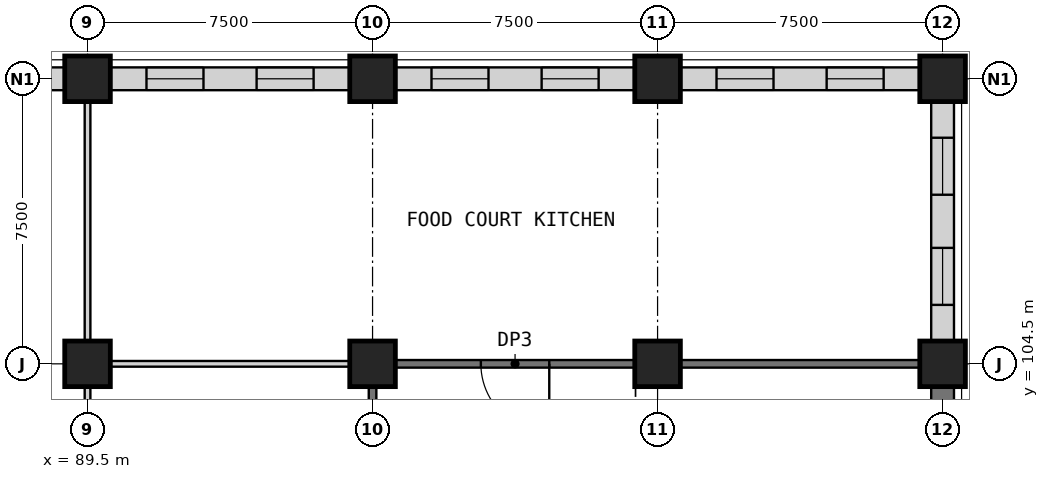
"""IFC4 building model, lengths in metres.
Left out: names, types, materials, properties, quantities, classifications, styles, units other than length and angle.
Written with IfcOpenShell. Run it as: python <this file> out.ifc"""

import sys

from ifc_helpers import new_model, si_unit, direction, frame, frame_2d, origin, origin_2d, place, context, subcontext, project, spatial, rectangle, extrude, element, fill, save


model = new_model("IFC4")
c1 = context("Model", 3, precision=1e-05, world=origin(), true_north=direction((0.0, 1.0)))
c2 = subcontext(c1, "Body", "Model", "MODEL_VIEW")
j1 = project(units=[si_unit("LENGTHUNIT", "METRE"), si_unit("PLANEANGLEUNIT", "RADIAN")], contexts=[c1])
p1 = place(None, origin())
s1 = spatial("IfcSite", under=j1, at=p1, CompositionType="ELEMENT")
p2 = place(p1, origin())
s2 = spatial("IfcBuilding", under=s1, at=p2, CompositionType="ELEMENT")
p3 = place(p2, frame((0.0, 0.0, 18.5)))
s3 = spatial("IfcBuildingStorey", under=s2, at=p3, CompositionType="ELEMENT", Elevation=18.5)
for number, where, z_axis, x_axis in (
    (1, (89.5, 104.5, 0.0), (0.0, 0.0, 1.0), (1.0, 0.0, 0.0)),
    (2, (89.5, 112.0, 0.0), (0.0, 0.0, 1.0), (1.0, 0.0, 0.0)),
    (3, (97.0, 104.5, 0.0), (0.0, 0.0, 1.0), (1.0, 0.0, 0.0)),
    (4, (97.0, 112.0, 0.0), (0.0, 0.0, 1.0), (1.0, 0.0, 0.0)),
    (5, (104.5, 104.5, 0.0), (0.0, 0.0, 1.0), (1.0, 0.0, 0.0)),
    (6, (104.5, 112.0, 0.0), (0.0, 0.0, 1.0), (1.0, 0.0, 0.0)),
    (7, (112.0, 104.5, 0.0), (0.0, 0.0, 1.0), (1.0, 0.0, 0.0)),
    (8, (112.0, 112.0, 0.0), (0.0, 0.0, 1.0), (1.0, 0.0, 0.0)),
):
    element("IfcColumn", number, at=place(p3, frame(where, z_axis=z_axis, x_axis=x_axis)), inside=s3, PredefinedType="COLUMN", context=c2, shape_type="SweptSolid", body=[
        extrude(rectangle(XDim=1.2, YDim=1.2, at=origin_2d()), origin(), (0.0, 0.0, 1.0), 5.0),
    ])
p4 = place(p3, frame((82.6, 112.0, 0.0), z_axis=(0.0, 0.0, 1.0), x_axis=(1.0, 0.0, 0.0)))
e9 = element("IfcWall", 9, at=p4, inside=s3, PredefinedType="PARTITIONING", context=c2, shape_type="SweptSolid", body=[
    extrude(rectangle(XDim=6.3, YDim=0.6, at=frame_2d((3.15, 0.0))), origin(), (0.0, 0.0, 1.0), 4.1),
])
p5 = place(p4, frame((0.951, 0.0, 0.9)))
e10 = element("IfcOpeningElement", 10, at=p5, cuts=e9, PredefinedType="OPENING", context=c2, shape_type="SweptSolid", body=[
    extrude(rectangle(XDim=1.5, YDim=2.8, at=frame_2d((0.75, 1.4))), frame((0.0, 0.31, 0.0), z_axis=(0.0, -1.0, 0.0), x_axis=(1.0, 0.0, 0.0)), (0.0, 0.0, 1.0), 0.62),
])
p6 = place(p4, frame((3.849, 0.0, 0.9)))
e11 = element("IfcOpeningElement", 11, at=p6, cuts=e9, PredefinedType="OPENING", context=c2, shape_type="SweptSolid", body=[
    extrude(rectangle(XDim=1.5, YDim=2.8, at=frame_2d((0.75, 1.4))), frame((0.0, 0.31, 0.0), z_axis=(0.0, -1.0, 0.0), x_axis=(1.0, 0.0, 0.0)), (0.0, 0.0, 1.0), 0.62),
])
p7 = place(p3, frame((90.1, 112.0, 0.0), z_axis=(0.0, 0.0, 1.0), x_axis=(1.0, 0.0, 0.0)))
e12 = element("IfcWall", 12, at=p7, inside=s3, PredefinedType="PARTITIONING", context=c2, shape_type="SweptSolid", body=[
    extrude(rectangle(XDim=6.3, YDim=0.6, at=frame_2d((3.15, 0.0))), origin(), (0.0, 0.0, 1.0), 4.1),
])
p8 = place(p7, frame((0.951, 0.0, 0.9)))
e13 = element("IfcOpeningElement", 13, at=p8, cuts=e12, PredefinedType="OPENING", context=c2, shape_type="SweptSolid", body=[
    extrude(rectangle(XDim=1.5, YDim=2.8, at=frame_2d((0.75, 1.4))), frame((0.0, 0.31, 0.0), z_axis=(0.0, -1.0, 0.0), x_axis=(1.0, 0.0, 0.0)), (0.0, 0.0, 1.0), 0.62),
])
p9 = place(p7, frame((3.849, 0.0, 0.9)))
e14 = element("IfcOpeningElement", 14, at=p9, cuts=e12, PredefinedType="OPENING", context=c2, shape_type="SweptSolid", body=[
    extrude(rectangle(XDim=1.5, YDim=2.8, at=frame_2d((0.75, 1.4))), frame((0.0, 0.31, 0.0), z_axis=(0.0, -1.0, 0.0), x_axis=(1.0, 0.0, 0.0)), (0.0, 0.0, 1.0), 0.62),
])
p10 = place(p3, frame((97.6, 112.0, 0.0), z_axis=(0.0, 0.0, 1.0), x_axis=(1.0, 0.0, 0.0)))
e15 = element("IfcWall", 15, at=p10, inside=s3, PredefinedType="PARTITIONING", context=c2, shape_type="SweptSolid", body=[
    extrude(rectangle(XDim=6.3, YDim=0.6, at=frame_2d((3.15, 0.0))), origin(), (0.0, 0.0, 1.0), 4.1),
])
p11 = place(p10, frame((0.951, 0.0, 0.9)))
e16 = element("IfcOpeningElement", 16, at=p11, cuts=e15, PredefinedType="OPENING", context=c2, shape_type="SweptSolid", body=[
    extrude(rectangle(XDim=1.5, YDim=2.8, at=frame_2d((0.75, 1.4))), frame((0.0, 0.31, 0.0), z_axis=(0.0, -1.0, 0.0), x_axis=(1.0, 0.0, 0.0)), (0.0, 0.0, 1.0), 0.62),
])
p12 = place(p10, frame((3.849, 0.0, 0.9)))
e17 = element("IfcOpeningElement", 17, at=p12, cuts=e15, PredefinedType="OPENING", context=c2, shape_type="SweptSolid", body=[
    extrude(rectangle(XDim=1.5, YDim=2.8, at=frame_2d((0.75, 1.4))), frame((0.0, 0.31, 0.0), z_axis=(0.0, -1.0, 0.0), x_axis=(1.0, 0.0, 0.0)), (0.0, 0.0, 1.0), 0.62),
])
p13 = place(p3, frame((105.1, 112.0, 0.0), z_axis=(0.0, 0.0, 1.0), x_axis=(1.0, 0.0, 0.0)))
e18 = element("IfcWall", 18, at=p13, inside=s3, PredefinedType="PARTITIONING", context=c2, shape_type="SweptSolid", body=[
    extrude(rectangle(XDim=6.3, YDim=0.6, at=frame_2d((3.15, 0.0))), origin(), (0.0, 0.0, 1.0), 4.1),
])
p14 = place(p13, frame((0.951, 0.0, 0.9)))
e19 = element("IfcOpeningElement", 19, at=p14, cuts=e18, PredefinedType="OPENING", context=c2, shape_type="SweptSolid", body=[
    extrude(rectangle(XDim=1.5, YDim=2.8, at=frame_2d((0.75, 1.4))), frame((0.0, 0.31, 0.0), z_axis=(0.0, -1.0, 0.0), x_axis=(1.0, 0.0, 0.0)), (0.0, 0.0, 1.0), 0.62),
])
p15 = place(p13, frame((3.849, 0.0, 0.9)))
e20 = element("IfcOpeningElement", 20, at=p15, cuts=e18, PredefinedType="OPENING", context=c2, shape_type="SweptSolid", body=[
    extrude(rectangle(XDim=1.5, YDim=2.8, at=frame_2d((0.75, 1.4))), frame((0.0, 0.31, 0.0), z_axis=(0.0, -1.0, 0.0), x_axis=(1.0, 0.0, 0.0)), (0.0, 0.0, 1.0), 0.62),
])
p16 = place(p3, frame((90.1, 104.5, 0.0), z_axis=(0.0, 0.0, 1.0), x_axis=(1.0, 0.0, 0.0)))
e21 = element("IfcWall", 21, at=p16, inside=s3, PredefinedType="PARTITIONING", context=c2, shape_type="SweptSolid", body=[
    extrude(rectangle(XDim=6.3, YDim=0.15, at=frame_2d((3.15, 0.0))), origin(), (0.0, 0.0, 1.0), 4.7),
])
p17 = place(p3, frame((103.9, 104.5, 0.0), z_axis=(0.0, 0.0, 1.0), x_axis=(-1.0, 0.0, 0.0)))
e22 = element("IfcWall", 22, at=p17, inside=s3, PredefinedType="SHEAR", context=c2, shape_type="SweptSolid", body=[
    extrude(rectangle(XDim=6.3, YDim=0.2, at=frame_2d((3.15, 0.0))), origin(), (0.0, 0.0, 1.0), 4.7),
])
p18 = place(p17, frame((2.25, 0.0, 0.0)))
e23 = element("IfcOpeningElement", 23, at=p18, cuts=e22, PredefinedType="OPENING", context=c2, shape_type="SweptSolid", body=[
    extrude(rectangle(XDim=1.8, YDim=2.4, at=frame_2d((0.9, 1.2))), frame((0.0, 0.11, 0.0), z_axis=(0.0, -1.0, 0.0), x_axis=(1.0, 0.0, 0.0)), (0.0, 0.0, 1.0), 0.22),
])
p19 = place(p3, frame((105.1, 104.5, 0.0), z_axis=(0.0, 0.0, 1.0), x_axis=(1.0, 0.0, 0.0)))
e24 = element("IfcWall", 24, at=p19, inside=s3, PredefinedType="SHEAR", context=c2, shape_type="SweptSolid", body=[
    extrude(rectangle(XDim=6.3, YDim=0.2, at=frame_2d((3.15, 0.0))), origin(), (0.0, 0.0, 1.0), 4.7),
])
p20 = place(p3, frame((97.0, 103.9, 0.0), z_axis=(0.0, 0.0, 1.0), x_axis=(0.0, -1.0, 0.0)))
e25 = element("IfcWall", 25, at=p20, inside=s3, PredefinedType="SHEAR", context=c2, shape_type="SweptSolid", body=[
    extrude(rectangle(XDim=6.3, YDim=0.2, at=frame_2d((3.15, 0.0))), origin(), (0.0, 0.0, 1.0), 4.7),
])
p21 = place(p20, frame((2.6, 0.0, 0.0)))
e26 = element("IfcOpeningElement", 26, at=p21, cuts=e25, PredefinedType="OPENING", context=c2, shape_type="SweptSolid", body=[
    extrude(rectangle(XDim=1.2, YDim=2.1, at=frame_2d((0.6, 1.05))), frame((0.0, 0.11, 0.0), z_axis=(0.0, -1.0, 0.0), x_axis=(1.0, 0.0, 0.0)), (0.0, 0.0, 1.0), 0.22),
])
p22 = place(p3, frame((112.0, 97.6, 0.0), z_axis=(0.0, 0.0, 1.0), x_axis=(0.0, 1.0, 0.0)))
e27 = element("IfcWall", 27, at=p22, inside=s3, PredefinedType="PARTITIONING", context=c2, shape_type="SweptSolid", body=[
    extrude(rectangle(XDim=6.3, YDim=0.6, at=frame_2d((3.15, 0.0))), origin(), (0.0, 0.0, 1.0), 4.1),
])
p23 = place(p3, frame((112.0, 105.1, 0.0), z_axis=(0.0, 0.0, 1.0), x_axis=(0.0, 1.0, 0.0)))
e28 = element("IfcWall", 28, at=p23, inside=s3, PredefinedType="PARTITIONING", context=c2, shape_type="SweptSolid", body=[
    extrude(rectangle(XDim=6.3, YDim=0.6, at=frame_2d((3.15, 0.0))), origin(), (0.0, 0.0, 1.0), 4.1),
])
p24 = place(p23, frame((0.951, 0.0, 0.9)))
e29 = element("IfcOpeningElement", 29, at=p24, cuts=e28, PredefinedType="OPENING", context=c2, shape_type="SweptSolid", body=[
    extrude(rectangle(XDim=1.5, YDim=2.8, at=frame_2d((0.75, 1.4))), frame((0.0, 0.31, 0.0), z_axis=(0.0, -1.0, 0.0), x_axis=(1.0, 0.0, 0.0)), (0.0, 0.0, 1.0), 0.62),
])
p25 = place(p23, frame((3.849, 0.0, 0.9)))
e30 = element("IfcOpeningElement", 30, at=p25, cuts=e28, PredefinedType="OPENING", context=c2, shape_type="SweptSolid", body=[
    extrude(rectangle(XDim=1.5, YDim=2.8, at=frame_2d((0.75, 1.4))), frame((0.0, 0.31, 0.0), z_axis=(0.0, -1.0, 0.0), x_axis=(1.0, 0.0, 0.0)), (0.0, 0.0, 1.0), 0.62),
])
p26 = place(p3, frame((89.5, 97.5, 0.0), z_axis=(0.0, 0.0, 1.0), x_axis=(0.0, 1.0, 0.0)))
e31 = element("IfcWall", 31, at=p26, inside=s3, PredefinedType="PARTITIONING", context=c2, shape_type="SweptSolid", body=[
    extrude(rectangle(XDim=6.4, YDim=0.15, at=frame_2d((3.2, 0.0))), origin(), (0.0, 0.0, 1.0), 4.7),
])
p27 = place(p3, frame((89.5, 105.1, 0.0), z_axis=(0.0, 0.0, 1.0), x_axis=(0.0, 1.0, 0.0)))
e32 = element("IfcWall", 32, at=p27, inside=s3, PredefinedType="PARTITIONING", context=c2, shape_type="SweptSolid", body=[
    extrude(rectangle(XDim=6.3, YDim=0.15, at=frame_2d((3.15, 0.0))), origin(), (0.0, 0.0, 1.0), 4.7),
])
p28 = place(p8, origin())
e33 = element("IfcWindow", 33, at=p28, inside=s3, PartitioningType="SINGLE_PANEL", PredefinedType="WINDOW", context=c2, shape_type="SweptSolid", body=[
    extrude(rectangle(XDim=1.5, YDim=2.8, at=frame_2d((0.75, 1.4))), frame((0.0, 0.03, 0.0), z_axis=(0.0, -1.0, 0.0), x_axis=(1.0, 0.0, 0.0)), (0.0, 0.0, 1.0), 0.06),
])
fill(e13, e33)
p29 = place(p9, origin())
e34 = element("IfcWindow", 34, at=p29, inside=s3, PartitioningType="SINGLE_PANEL", PredefinedType="WINDOW", context=c2, shape_type="SweptSolid", body=[
    extrude(rectangle(XDim=1.5, YDim=2.8, at=frame_2d((0.75, 1.4))), frame((0.0, 0.03, 0.0), z_axis=(0.0, -1.0, 0.0), x_axis=(1.0, 0.0, 0.0)), (0.0, 0.0, 1.0), 0.06),
])
fill(e14, e34)
p30 = place(p11, origin())
e35 = element("IfcWindow", 35, at=p30, inside=s3, PartitioningType="SINGLE_PANEL", PredefinedType="WINDOW", context=c2, shape_type="SweptSolid", body=[
    extrude(rectangle(XDim=1.5, YDim=2.8, at=frame_2d((0.75, 1.4))), frame((0.0, 0.03, 0.0), z_axis=(0.0, -1.0, 0.0), x_axis=(1.0, 0.0, 0.0)), (0.0, 0.0, 1.0), 0.06),
])
fill(e16, e35)
p31 = place(p12, origin())
e36 = element("IfcWindow", 36, at=p31, inside=s3, PartitioningType="SINGLE_PANEL", PredefinedType="WINDOW", context=c2, shape_type="SweptSolid", body=[
    extrude(rectangle(XDim=1.5, YDim=2.8, at=frame_2d((0.75, 1.4))), frame((0.0, 0.03, 0.0), z_axis=(0.0, -1.0, 0.0), x_axis=(1.0, 0.0, 0.0)), (0.0, 0.0, 1.0), 0.06),
])
fill(e17, e36)
p32 = place(p14, origin())
e37 = element("IfcWindow", 37, at=p32, inside=s3, PartitioningType="SINGLE_PANEL", PredefinedType="WINDOW", context=c2, shape_type="SweptSolid", body=[
    extrude(rectangle(XDim=1.5, YDim=2.8, at=frame_2d((0.75, 1.4))), frame((0.0, 0.03, 0.0), z_axis=(0.0, -1.0, 0.0), x_axis=(1.0, 0.0, 0.0)), (0.0, 0.0, 1.0), 0.06),
])
fill(e19, e37)
p33 = place(p15, origin())
e38 = element("IfcWindow", 38, at=p33, inside=s3, PartitioningType="SINGLE_PANEL", PredefinedType="WINDOW", context=c2, shape_type="SweptSolid", body=[
    extrude(rectangle(XDim=1.5, YDim=2.8, at=frame_2d((0.75, 1.4))), frame((0.0, 0.03, 0.0), z_axis=(0.0, -1.0, 0.0), x_axis=(1.0, 0.0, 0.0)), (0.0, 0.0, 1.0), 0.06),
])
fill(e20, e38)
p34 = place(p18, origin())
e39 = element("IfcDoor", 39, at=p34, inside=s3, OperationType="SINGLE_SWING_LEFT", PredefinedType="DOOR", context=c2, shape_type="SweptSolid", body=[
    extrude(rectangle(XDim=1.8, YDim=2.4, at=frame_2d((0.9, 1.2))), frame((0.0, 0.025, 0.0), z_axis=(0.0, -1.0, 0.0), x_axis=(1.0, 0.0, 0.0)), (0.0, 0.0, 1.0), 0.05),
])
fill(e23, e39)
p35 = place(p24, origin())
e40 = element("IfcWindow", 40, at=p35, inside=s3, PartitioningType="SINGLE_PANEL", PredefinedType="WINDOW", context=c2, shape_type="SweptSolid", body=[
    extrude(rectangle(XDim=1.5, YDim=2.8, at=frame_2d((0.75, 1.4))), frame((0.0, 0.03, 0.0), z_axis=(0.0, -1.0, 0.0), x_axis=(1.0, 0.0, 0.0)), (0.0, 0.0, 1.0), 0.06),
])
fill(e29, e40)
p36 = place(p25, origin())
e41 = element("IfcWindow", 41, at=p36, inside=s3, PartitioningType="SINGLE_PANEL", PredefinedType="WINDOW", context=c2, shape_type="SweptSolid", body=[
    extrude(rectangle(XDim=1.5, YDim=2.8, at=frame_2d((0.75, 1.4))), frame((0.0, 0.03, 0.0), z_axis=(0.0, -1.0, 0.0), x_axis=(1.0, 0.0, 0.0)), (0.0, 0.0, 1.0), 0.06),
])
fill(e30, e41)
save(model, sys.argv[1])
